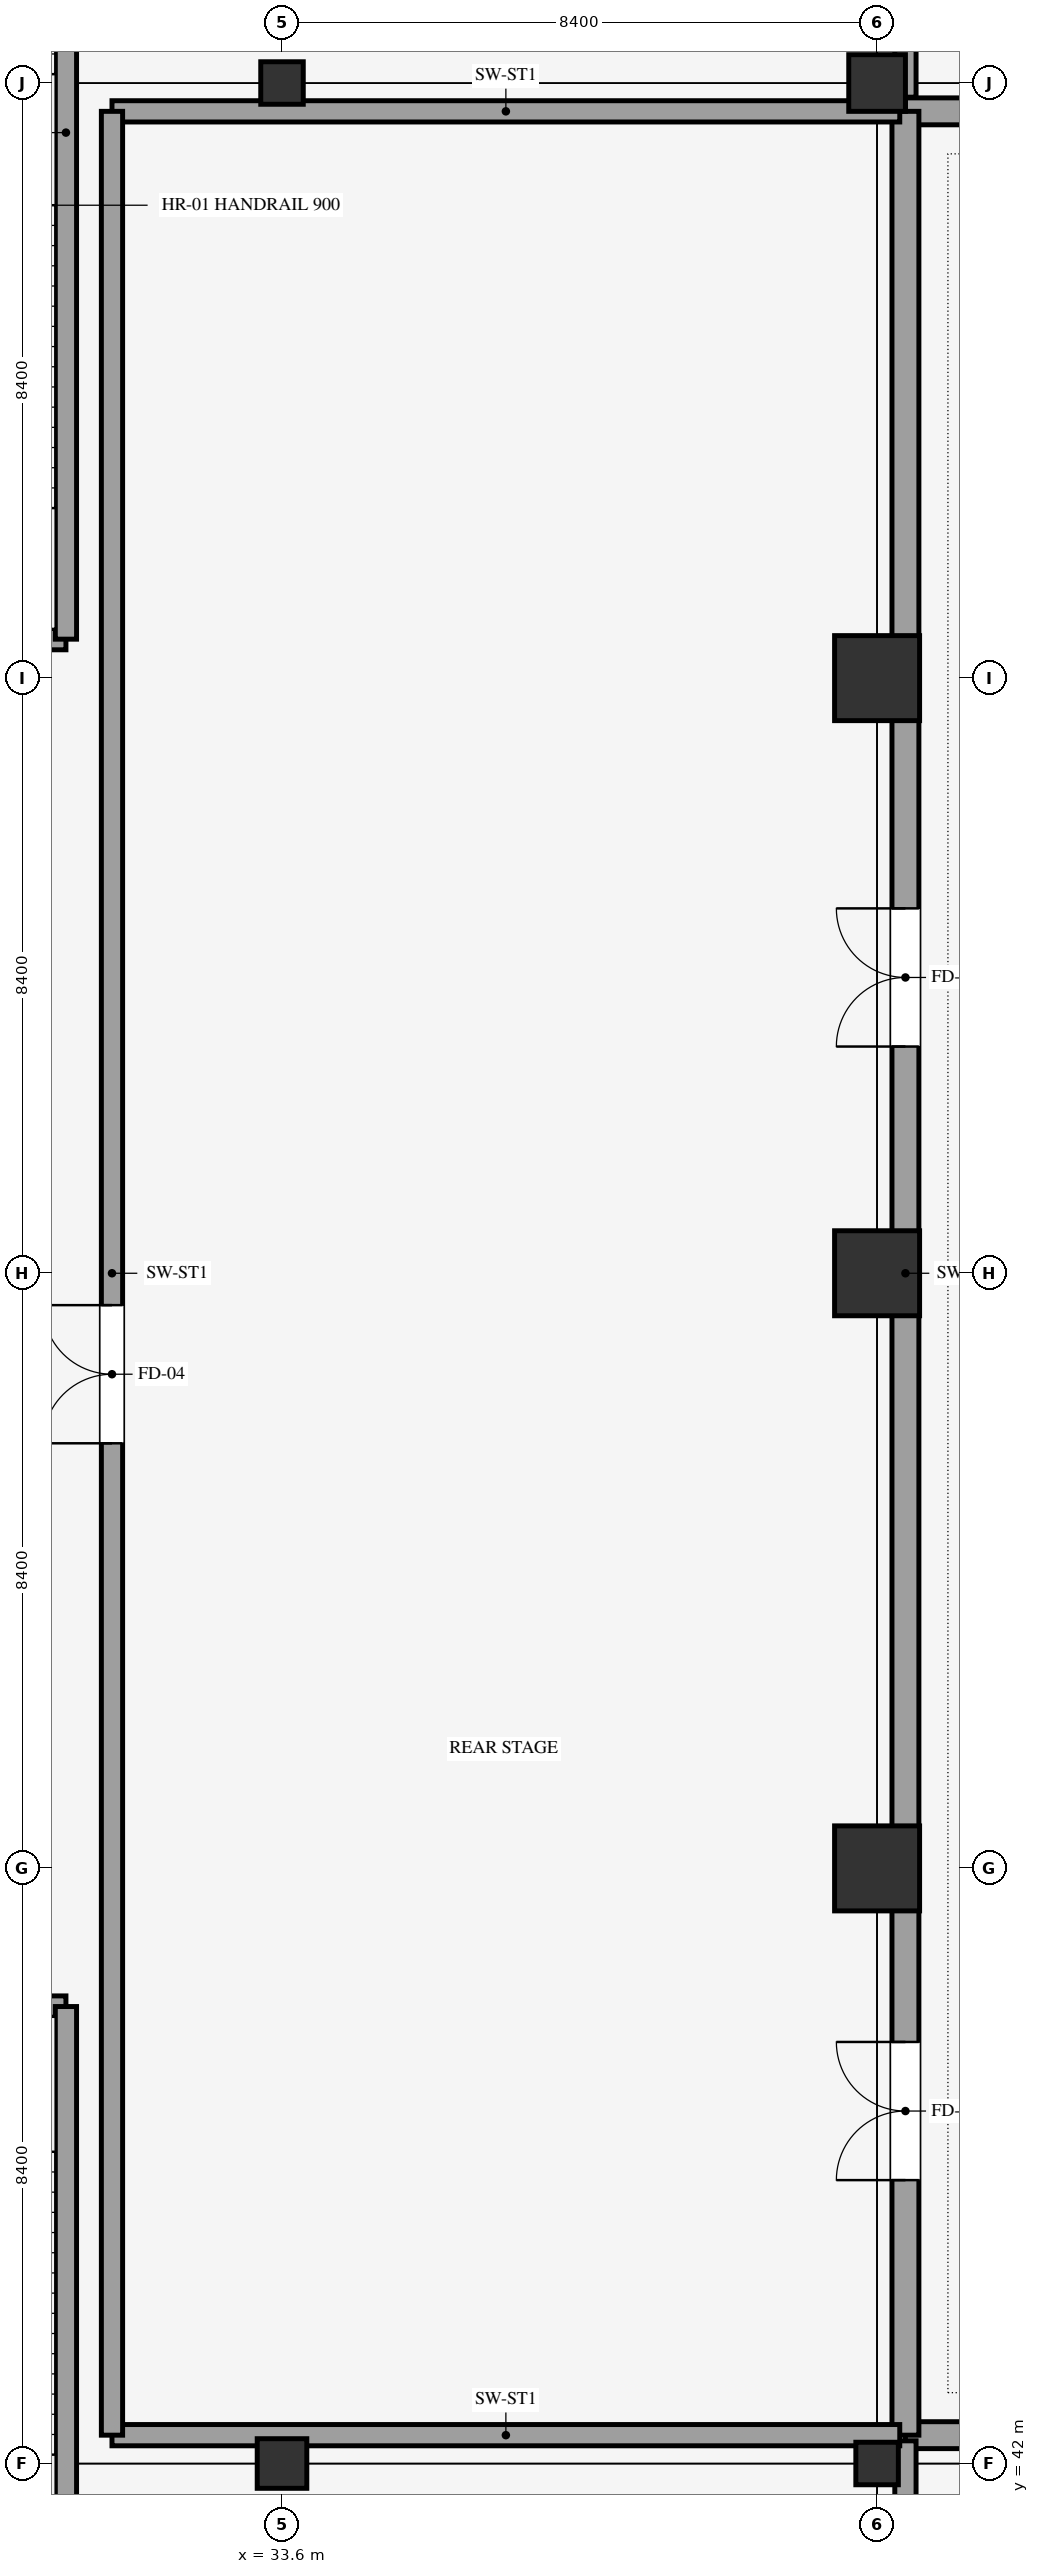
"""IFC4 building model, lengths in metres.
Left out: names, types, materials, properties, quantities, classifications, styles, units other than length and angle.
Written with IfcOpenShell. Run it as: python <this file> out.ifc"""

import sys

from ifc_helpers import new_model, si_unit, direction, frame, frame_2d, origin, origin_2d, place, context, subcontext, project, spatial, rectangle, extrude, element, fill, save


model = new_model("IFC4")
c1 = context("Model", 3, precision=1e-05, world=origin(), true_north=direction((0.0, 1.0)))
c2 = subcontext(c1, "Body", "Model", "MODEL_VIEW")
j1 = project(units=[si_unit("LENGTHUNIT", "METRE"), si_unit("PLANEANGLEUNIT", "RADIAN")], contexts=[c1])
p1 = place(None, origin())
s1 = spatial("IfcSite", under=j1, at=p1, CompositionType="ELEMENT")
p2 = place(p1, origin())
s2 = spatial("IfcBuilding", under=s1, at=p2, CompositionType="ELEMENT")
p3 = place(p2, origin())
s3 = spatial("IfcBuildingStorey", under=s2, at=p3, CompositionType="ELEMENT", Elevation=0.0)
p4 = place(p3, frame((33.6, 42.0, 0.0), z_axis=(0.0, 0.0, 1.0), x_axis=(1.0, 0.0, 0.0)))
e1 = element("IfcColumn", 1, at=p4, inside=s3, PredefinedType="COLUMN", context=c2, shape_type="SweptSolid", body=[
    extrude(rectangle(XDim=0.7, YDim=0.7, at=origin_2d()), origin(), (0.0, 0.0, 1.0), 5.4),
])
for number, where, z_axis, x_axis in (
    (2, (33.6, 75.6, 0.0), (0.0, 0.0, 1.0), (1.0, 0.0, 0.0)),
    (3, (42.0, 42.0, 0.0), (0.0, 0.0, 1.0), (1.0, 0.0, 0.0)),
):
    element("IfcColumn", number, at=place(p3, frame(where, z_axis=z_axis, x_axis=x_axis)), inside=s3, PredefinedType="COLUMN", context=c2, shape_type="SweptSolid", body=[
        extrude(rectangle(XDim=0.6, YDim=0.6, at=origin_2d()), origin(), (0.0, 0.0, 1.0), 5.4),
    ])
for number, where, z_axis, x_axis in (
    (4, (42.0, 50.4, 0.0), (0.0, 0.0, 1.0), (1.0, 0.0, 0.0)),
    (5, (42.0, 58.8, 0.0), (0.0, 0.0, 1.0), (1.0, 0.0, 0.0)),
    (6, (42.0, 67.2, 0.0), (0.0, 0.0, 1.0), (1.0, 0.0, 0.0)),
):
    element("IfcColumn", number, at=place(p3, frame(where, z_axis=z_axis, x_axis=x_axis)), inside=s3, PredefinedType="COLUMN", context=c2, shape_type="SweptSolid", body=[
        extrude(rectangle(XDim=1.2, YDim=1.2, at=origin_2d()), origin(), (0.0, 0.0, 1.0), 5.4),
    ])
p5 = place(p3, frame((42.0, 75.6, 0.0), z_axis=(0.0, 0.0, 1.0), x_axis=(1.0, 0.0, 0.0)))
e7 = element("IfcColumn", 7, at=p5, inside=s3, PredefinedType="COLUMN", context=c2, shape_type="SweptSolid", body=[
    extrude(rectangle(XDim=0.8, YDim=0.8, at=origin_2d()), origin(), (0.0, 0.0, 1.0), 5.4),
])
p6 = place(p3, frame((26.05, 48.45, 0.0), z_axis=(0.0, 0.0, 1.0), x_axis=(1.0, 0.0, 0.0)))
e8 = element("IfcWall", 8, at=p6, inside=s3, PredefinedType="SHEAR", context=c2, shape_type="SweptSolid", body=[
    extrude(rectangle(XDim=4.5, YDim=0.3, at=frame_2d((2.25, 0.0))), origin(), (0.0, 0.0, 1.0), 5.4),
])
p7 = place(p3, frame((30.55, 34.15, 0.0), z_axis=(0.0, 0.0, 1.0), x_axis=(0.0, 1.0, 0.0)))
e9 = element("IfcWall", 9, at=p7, inside=s3, PredefinedType="SHEAR", context=c2, shape_type="SweptSolid", body=[
    extrude(rectangle(XDim=14.3, YDim=0.3, at=frame_2d((7.15, 0.0))), origin(), (0.0, 0.0, 1.0), 5.4),
])
p8 = place(p3, frame((26.05, 67.75, 0.0), z_axis=(0.0, 0.0, 1.0), x_axis=(1.0, 0.0, 0.0)))
e10 = element("IfcWall", 10, at=p8, inside=s3, PredefinedType="SHEAR", context=c2, shape_type="SweptSolid", body=[
    extrude(rectangle(XDim=4.5, YDim=0.3, at=frame_2d((2.25, 0.0))), origin(), (0.0, 0.0, 1.0), 5.4),
])
p9 = place(p3, frame((30.55, 67.75, 0.0), z_axis=(0.0, 0.0, 1.0), x_axis=(0.0, 1.0, 0.0)))
e11 = element("IfcWall", 11, at=p9, inside=s3, PredefinedType="SHEAR", context=c2, shape_type="SweptSolid", body=[
    extrude(rectangle(XDim=14.3, YDim=0.3, at=frame_2d((7.15, 0.0))), origin(), (0.0, 0.0, 1.0), 5.4),
])
p10 = place(p3, frame((42.4, 42.4, 0.0), z_axis=(0.0, 0.0, 1.0), x_axis=(1.0, 0.0, 0.0)))
e12 = element("IfcWall", 12, at=p10, inside=s3, PredefinedType="SHEAR", context=c2, shape_type="SweptSolid", body=[
    extrude(rectangle(XDim=24.4, YDim=0.38, at=frame_2d((12.2, 0.0))), origin(), (0.0, 0.0, 1.0), 4.55),
])
p11 = place(p10, frame((4.0, 0.0, 0.0)))
e13 = element("IfcOpeningElement", 13, at=p11, cuts=e12, PredefinedType="OPENING", context=c2, shape_type="SweptSolid", body=[
    extrude(rectangle(XDim=1.95, YDim=2.3, at=frame_2d((0.975, 1.15))), frame((0.0, 0.2, 0.0), z_axis=(0.0, -1.0, 0.0), x_axis=(1.0, 0.0, 0.0)), (0.0, 0.0, 1.0), 0.4),
])
p12 = place(p3, frame((42.4, 75.2, 0.0), z_axis=(0.0, 0.0, 1.0), x_axis=(1.0, 0.0, 0.0)))
e14 = element("IfcWall", 14, at=p12, inside=s3, PredefinedType="SHEAR", context=c2, shape_type="SweptSolid", body=[
    extrude(rectangle(XDim=24.4, YDim=0.38, at=frame_2d((12.2, 0.0))), origin(), (0.0, 0.0, 1.0), 4.55),
])
p13 = place(p12, frame((4.0, 0.0, 0.0)))
e15 = element("IfcOpeningElement", 15, at=p13, cuts=e14, PredefinedType="OPENING", context=c2, shape_type="SweptSolid", body=[
    extrude(rectangle(XDim=1.95, YDim=2.3, at=frame_2d((0.975, 1.15))), frame((0.0, 0.2, 0.0), z_axis=(0.0, -1.0, 0.0), x_axis=(1.0, 0.0, 0.0)), (0.0, 0.0, 1.0), 0.4),
])
p14 = place(p3, frame((42.4, 42.4, 0.0), z_axis=(0.0, 0.0, 1.0), x_axis=(0.0, 1.0, 0.0)))
e16 = element("IfcWall", 16, at=p14, inside=s3, PredefinedType="SHEAR", context=c2, shape_type="SweptSolid", body=[
    extrude(rectangle(XDim=32.8, YDim=0.38, at=frame_2d((16.4, 0.0))), origin(), (0.0, 0.0, 1.0), 4.55),
])
p15 = place(p14, frame((3.6, 0.0, 0.0)))
e17 = element("IfcOpeningElement", 17, at=p15, cuts=e16, PredefinedType="OPENING", context=c2, shape_type="SweptSolid", body=[
    extrude(rectangle(XDim=1.95, YDim=2.3, at=frame_2d((0.975, 1.15))), frame((0.0, 0.2, 0.0), z_axis=(0.0, -1.0, 0.0), x_axis=(1.0, 0.0, 0.0)), (0.0, 0.0, 1.0), 0.4),
])
p16 = place(p14, frame((19.6, 0.0, 0.0)))
e18 = element("IfcOpeningElement", 18, at=p16, cuts=e16, PredefinedType="OPENING", context=c2, shape_type="SweptSolid", body=[
    extrude(rectangle(XDim=1.95, YDim=2.3, at=frame_2d((0.975, 1.15))), frame((0.0, 0.2, 0.0), z_axis=(0.0, -1.0, 0.0), x_axis=(1.0, 0.0, 0.0)), (0.0, 0.0, 1.0), 0.4),
])
p17 = place(p3, frame((42.4, 17.4, 0.0), z_axis=(0.0, 0.0, 1.0), x_axis=(0.0, 1.0, 0.0)))
e19 = element("IfcWall", 19, at=p17, inside=s3, PredefinedType="SHEAR", context=c2, shape_type="SweptSolid", body=[
    extrude(rectangle(XDim=24.92, YDim=0.3, at=frame_2d((12.46, 0.0))), origin(), (0.0, 0.0, 1.0), 4.55),
])
p18 = place(p17, frame((10.0, 0.0, 0.0)))
e20 = element("IfcOpeningElement", 20, at=p18, cuts=e19, PredefinedType="OPENING", context=c2, shape_type="SweptSolid", body=[
    extrude(rectangle(XDim=1.75, YDim=2.2, at=frame_2d((0.875, 1.1))), frame((0.0, 0.16, 0.0), z_axis=(0.0, -1.0, 0.0), x_axis=(1.0, 0.0, 0.0)), (0.0, 0.0, 1.0), 0.32),
])
p19 = place(p3, frame((42.4, 75.4, 0.0), z_axis=(0.0, 0.0, 1.0), x_axis=(0.0, 1.0, 0.0)))
e21 = element("IfcWall", 21, at=p19, inside=s3, PredefinedType="SHEAR", context=c2, shape_type="SweptSolid", body=[
    extrude(rectangle(XDim=24.8, YDim=0.3, at=frame_2d((12.4, 0.0))), origin(), (0.0, 0.0, 1.0), 4.55),
])
p20 = place(p19, frame((10.0, 0.0, 0.0)))
e22 = element("IfcOpeningElement", 22, at=p20, cuts=e21, PredefinedType="OPENING", context=c2, shape_type="SweptSolid", body=[
    extrude(rectangle(XDim=1.75, YDim=2.2, at=frame_2d((0.875, 1.1))), frame((0.0, 0.16, 0.0), z_axis=(0.0, -1.0, 0.0), x_axis=(1.0, 0.0, 0.0)), (0.0, 0.0, 1.0), 0.32),
])
for number, where, z_axis, x_axis in (
    (23, (31.2, 42.4, 0.0), (0.0, 0.0, 1.0), (1.0, 0.0, 0.0)),
    (24, (31.2, 75.2, 0.0), (0.0, 0.0, 1.0), (1.0, 0.0, 0.0)),
):
    element("IfcWall", number, at=place(p3, frame(where, z_axis=z_axis, x_axis=x_axis)), inside=s3, PredefinedType="SHEAR", context=c2, shape_type="SweptSolid", body=[
        extrude(rectangle(XDim=11.12, YDim=0.3, at=frame_2d((5.56, 0.0))), origin(), (0.0, 0.0, 1.0), 4.55),
    ])
p21 = place(p3, frame((31.2, 42.4, 0.0), z_axis=(0.0, 0.0, 1.0), x_axis=(0.0, 1.0, 0.0)))
e25 = element("IfcWall", 25, at=p21, inside=s3, PredefinedType="SHEAR", context=c2, shape_type="SweptSolid", body=[
    extrude(rectangle(XDim=32.8, YDim=0.3, at=frame_2d((16.4, 0.0))), origin(), (0.0, 0.0, 1.0), 4.55),
])
p22 = place(p21, frame((14.0, 0.0, 0.0)))
e26 = element("IfcOpeningElement", 26, at=p22, cuts=e25, PredefinedType="OPENING", context=c2, shape_type="SweptSolid", body=[
    extrude(rectangle(XDim=1.95, YDim=2.3, at=frame_2d((0.975, 1.15))), frame((0.0, 0.16, 0.0), z_axis=(0.0, -1.0, 0.0), x_axis=(1.0, 0.0, 0.0)), (0.0, 0.0, 1.0), 0.32),
])
p23 = place(p15, origin())
e27 = element("IfcDoor", 27, at=p23, inside=s3, OperationType="DOUBLE_DOOR_SINGLE_SWING", PredefinedType="DOOR", context=c2, shape_type="SweptSolid", body=[
    extrude(rectangle(XDim=1.95, YDim=2.3, at=frame_2d((0.975, 1.15))), frame((0.0, 0.025, 0.0), z_axis=(0.0, -1.0, 0.0), x_axis=(1.0, 0.0, 0.0)), (0.0, 0.0, 1.0), 0.05),
])
fill(e17, e27)
p24 = place(p16, origin())
e28 = element("IfcDoor", 28, at=p24, inside=s3, OperationType="DOUBLE_DOOR_SINGLE_SWING", PredefinedType="DOOR", context=c2, shape_type="SweptSolid", body=[
    extrude(rectangle(XDim=1.95, YDim=2.3, at=frame_2d((0.975, 1.15))), frame((0.0, 0.025, 0.0), z_axis=(0.0, -1.0, 0.0), x_axis=(1.0, 0.0, 0.0)), (0.0, 0.0, 1.0), 0.05),
])
fill(e18, e28)
p25 = place(p22, origin())
e29 = element("IfcDoor", 29, at=p25, inside=s3, OperationType="DOUBLE_DOOR_SINGLE_SWING", PredefinedType="DOOR", context=c2, shape_type="SweptSolid", body=[
    extrude(rectangle(XDim=1.95, YDim=2.3, at=frame_2d((0.975, 1.15))), frame((0.0, 0.025, 0.0), z_axis=(0.0, -1.0, 0.0), x_axis=(1.0, 0.0, 0.0)), (0.0, 0.0, 1.0), 0.05),
])
fill(e26, e29)
save(model, sys.argv[1])
